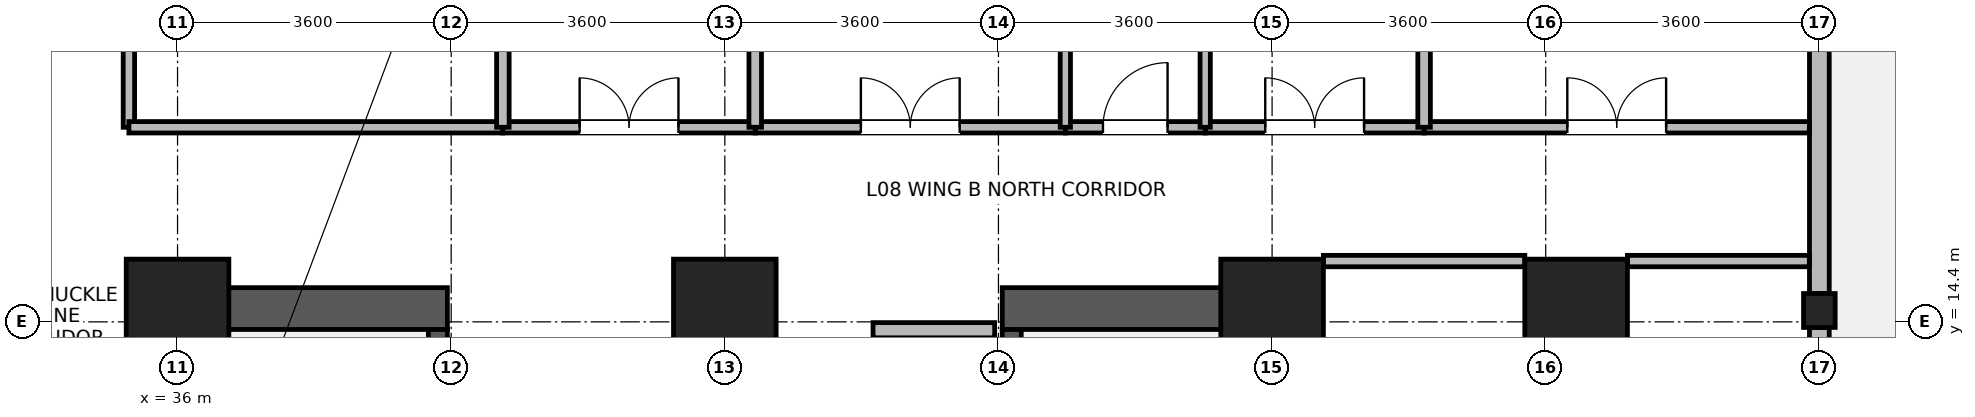
"""IFC4 building model, lengths in metres.
Left out: names, types, materials, properties, quantities, classifications, styles, units other than length and angle.
Written with IfcOpenShell. Run it as: python <this file> out.ifc"""

import sys

from ifc_helpers import new_model, si_unit, direction, frame, frame_2d, origin, origin_2d, place, context, subcontext, project, spatial, rectangle, i_section, extrude, source, transform, mapped, element, fill, save


model = new_model("IFC4")
c1 = context("Model", 3, precision=1e-05, world=origin(), true_north=direction((0.0, 1.0)))
c2 = subcontext(c1, "Body", "Model", "MODEL_VIEW")
j1 = project(units=[si_unit("LENGTHUNIT", "METRE"), si_unit("PLANEANGLEUNIT", "RADIAN")], contexts=[c1])
p1 = place(None, origin())
s1 = spatial("IfcSite", under=j1, at=p1, CompositionType="ELEMENT")
p2 = place(p1, origin())
s2 = spatial("IfcBuilding", under=s1, at=p2, CompositionType="ELEMENT")
p3 = place(p2, frame((0.0, 0.0, 36.4)))
s3 = spatial("IfcBuildingStorey", under=s2, at=p3, CompositionType="ELEMENT", Elevation=36.4)
for number, where, z_axis, x_axis in (
    (1, (36.075, 6.75, 0.0), (0.0, 0.0, 1.0), (0.0, 1.0, 0.0)),
    (2, (50.325, 6.75, 0.0), (0.0, 0.0, 1.0), (0.0, 1.0, 0.0)),
):
    element("IfcWall", number, at=place(p3, frame(where, z_axis=z_axis, x_axis=x_axis)), inside=s3, PredefinedType="SHEAR", context=c2, shape_type="SweptSolid", body=[
        extrude(rectangle(XDim=8.1, YDim=0.55, at=frame_2d((4.05, 0.0))), origin(), (0.0, 0.0, 1.0), 3.45),
    ])
for number, where, z_axis, x_axis in (
    (3, (36.35, 14.575, 0.0), (0.0, 0.0, 1.0), (1.0, 0.0, 0.0)),
    (4, (46.85, 14.575, 0.0), (0.0, 0.0, 1.0), (1.0, 0.0, 0.0)),
):
    element("IfcWall", number, at=place(p3, frame(where, z_axis=z_axis, x_axis=x_axis)), inside=s3, PredefinedType="SHEAR", context=c2, shape_type="SweptSolid", body=[
        extrude(rectangle(XDim=3.2, YDim=0.55, at=frame_2d((1.6, 0.0))), origin(), (0.0, 0.0, 1.0), 3.45),
    ])
p4 = place(p3, frame((39.425, 7.3, 0.0), z_axis=(0.0, 0.0, 1.0), x_axis=(0.0, 1.0, 0.0)))
e5 = element("IfcWall", 5, at=p4, inside=s3, PredefinedType="SHEAR", context=c2, shape_type="SweptSolid", body=[
    extrude(rectangle(XDim=7.0, YDim=0.25, at=frame_2d((3.5, 0.0))), origin(), (0.0, 0.0, 1.0), 3.45),
])
p5 = place(p4, frame((0.15, 0.0, 0.0)))
e6 = element("IfcOpeningElement", 6, at=p5, cuts=e5, PredefinedType="OPENING", context=c2, shape_type="SweptSolid", body=[
    extrude(rectangle(XDim=1.1, YDim=2.08, at=frame_2d((0.55, 1.04))), frame((0.0, 0.135, 0.0), z_axis=(0.0, -1.0, 0.0), x_axis=(1.0, 0.0, 0.0)), (0.0, 0.0, 1.0), 0.27),
])
p6 = place(p3, frame((46.975, 7.3, 0.0), z_axis=(0.0, 0.0, 1.0), x_axis=(0.0, 1.0, 0.0)))
e7 = element("IfcWall", 7, at=p6, inside=s3, PredefinedType="SHEAR", context=c2, shape_type="SweptSolid", body=[
    extrude(rectangle(XDim=7.0, YDim=0.25, at=frame_2d((3.5, 0.0))), origin(), (0.0, 0.0, 1.0), 3.45),
])
p7 = place(p6, frame((0.15, 0.0, 0.0)))
e8 = element("IfcOpeningElement", 8, at=p7, cuts=e7, PredefinedType="OPENING", context=c2, shape_type="SweptSolid", body=[
    extrude(rectangle(XDim=1.1, YDim=2.08, at=frame_2d((0.55, 1.04))), frame((0.0, 0.135, 0.0), z_axis=(0.0, -1.0, 0.0), x_axis=(1.0, 0.0, 0.0)), (0.0, 0.0, 1.0), 0.27),
])
m1 = source(origin(), c2, "Body", "SweptSolid", [
    extrude(rectangle(XDim=1.35, YDim=1.35, at=origin_2d()), origin(), (0.0, 0.0, 1.0), 3.7),
])
for number, where, z_axis, x_axis in (
    (9, (36.0, 14.55, 0.0), (0.0, 0.0, 1.0), (1.0, 0.0, 0.0)),
    (10, (43.2, 14.55, 0.0), (0.0, 0.0, 1.0), (1.0, 0.0, 0.0)),
    (11, (50.4, 14.55, 0.0), (0.0, 0.0, 1.0), (1.0, 0.0, 0.0)),
    (12, (54.4, 14.55, 0.0), (0.0, 0.0, 1.0), (1.0, 0.0, 0.0)),
):
    element("IfcColumn", number, at=place(p3, frame(where, z_axis=z_axis, x_axis=x_axis)), inside=s3, PredefinedType="COLUMN", context=c2, shape_type="MappedRepresentation", body=[
        mapped(m1, transform((0.0, 0.0, 0.0), x_axis=(1.0, 0.0, 0.0), y_axis=(0.0, 1.0, 0.0), z_axis=(0.0, 0.0, 1.0), scale=1.0)),
    ])
m2 = source(origin(), c2, "Body", "SweptSolid", [
    extrude(i_section(OverallWidth=0.416, OverallDepth=0.446, WebThickness=0.029, FlangeThickness=0.04, FilletRadius=0.015, at=origin_2d()), origin(), (0.0, 0.0, 1.0), 3.7),
])
p8 = place(p3, frame((57.6, 14.55, 0.0), z_axis=(0.0, 0.0, 1.0), x_axis=(1.0, 0.0, 0.0)))
e13 = element("IfcColumn", 13, at=p8, inside=s3, PredefinedType="COLUMN", context=c2, shape_type="MappedRepresentation", body=[
    mapped(m2, transform((0.0, 0.0, 0.0), x_axis=(1.0, 0.0, 0.0), y_axis=(0.0, 1.0, 0.0), z_axis=(0.0, 0.0, 1.0), scale=1.0)),
])
p9 = place(p3, frame((57.6, 14.326, 0.0), z_axis=(0.0, 0.0, 1.0), x_axis=(0.0, -1.0, 0.0)))
e14 = element("IfcWall", 14, at=p9, inside=s3, PredefinedType="STANDARD", context=c2, shape_type="SweptSolid", body=[
    extrude(rectangle(XDim=7.052, YDim=0.26, at=frame_2d((3.526, 0.0))), origin(), (0.0, 0.0, 1.0), 2.93),
])
p10 = place(p9, frame((0.863, 0.0, 0.85)))
e15 = element("IfcOpeningElement", 15, at=p10, cuts=e14, PredefinedType="OPENING", context=c2, shape_type="SweptSolid", body=[
    extrude(rectangle(XDim=1.8, YDim=1.85, at=frame_2d((0.9, 0.925))), frame((0.0, 0.14, 0.0), z_axis=(0.0, -1.0, 0.0), x_axis=(1.0, 0.0, 0.0)), (0.0, 0.0, 1.0), 0.28),
])
p11 = place(p9, frame((4.389, 0.0, 0.85)))
e16 = element("IfcOpeningElement", 16, at=p11, cuts=e14, PredefinedType="OPENING", context=c2, shape_type="SweptSolid", body=[
    extrude(rectangle(XDim=1.8, YDim=1.85, at=frame_2d((0.9, 0.925))), frame((0.0, 0.14, 0.0), z_axis=(0.0, -1.0, 0.0), x_axis=(1.0, 0.0, 0.0)), (0.0, 0.0, 1.0), 0.28),
])
p12 = place(p3, frame((57.6, 21.376, 0.0), z_axis=(0.0, 0.0, 1.0), x_axis=(0.0, -1.0, 0.0)))
e17 = element("IfcWall", 17, at=p12, inside=s3, PredefinedType="STANDARD", context=c2, shape_type="SweptSolid", body=[
    extrude(rectangle(XDim=6.602, YDim=0.26, at=frame_2d((3.301, 0.0))), origin(), (0.0, 0.0, 1.0), 2.93),
])
p13 = place(p12, frame((0.75, 0.0, 0.85)))
e18 = element("IfcOpeningElement", 18, at=p13, cuts=e17, PredefinedType="OPENING", context=c2, shape_type="SweptSolid", body=[
    extrude(rectangle(XDim=1.8, YDim=1.85, at=frame_2d((0.9, 0.925))), frame((0.0, 0.14, 0.0), z_axis=(0.0, -1.0, 0.0), x_axis=(1.0, 0.0, 0.0)), (0.0, 0.0, 1.0), 0.28),
])
p14 = place(p3, frame((45.15, 14.29, 0.0), z_axis=(0.0, 0.0, 1.0), x_axis=(1.0, 0.0, 0.0)))
e19 = element("IfcWall", 19, at=p14, inside=s3, PredefinedType="PARTITIONING", context=c2, shape_type="SweptSolid", body=[
    extrude(rectangle(XDim=1.6, YDim=0.2, at=frame_2d((0.8, 0.0))), origin(), (0.0, 0.0, 1.0), 2.23),
])
p15 = place(p3, frame((35.36, 16.96, 0.0), z_axis=(0.0, 0.0, 1.0), x_axis=(0.0, 1.0, 0.0)))
e20 = element("IfcWall", 20, at=p15, inside=s3, PredefinedType="PARTITIONING", context=c2, shape_type="SweptSolid", body=[
    extrude(rectangle(XDim=3.965, YDim=0.15, at=frame_2d((1.982, 0.0))), origin(), (0.0, 0.0, 1.0), 3.43),
])
p16 = place(p15, frame((1.333, 0.0, 0.0)))
e21 = element("IfcOpeningElement", 21, at=p16, cuts=e20, PredefinedType="OPENING", context=c2, shape_type="SweptSolid", body=[
    extrude(rectangle(XDim=1.3, YDim=2.12, at=frame_2d((0.65, 1.06))), frame((0.0, 0.085, 0.0), z_axis=(0.0, -1.0, 0.0), x_axis=(1.0, 0.0, 0.0)), (0.0, 0.0, 1.0), 0.17),
])
p17 = place(p3, frame((51.075, 15.2, 0.0), z_axis=(0.0, 0.0, 1.0), x_axis=(1.0, 0.0, 0.0)))
e22 = element("IfcWall", 22, at=p17, inside=s3, PredefinedType="PARTITIONING", context=c2, shape_type="SweptSolid", body=[
    extrude(rectangle(XDim=2.65, YDim=0.15, at=frame_2d((1.325, 0.0))), origin(), (0.0, 0.0, 1.0), 3.43),
])
p18 = place(p3, frame((55.075, 15.2, 0.0), z_axis=(0.0, 0.0, 1.0), x_axis=(1.0, 0.0, 0.0)))
e23 = element("IfcWall", 23, at=p18, inside=s3, PredefinedType="PARTITIONING", context=c2, shape_type="SweptSolid", body=[
    extrude(rectangle(XDim=2.393, YDim=0.15, at=frame_2d((1.197, 0.0))), origin(), (0.0, 0.0, 1.0), 3.43),
])
p19 = place(p3, frame((52.4, 16.96, 0.0), z_axis=(0.0, 0.0, 1.0), x_axis=(1.0, 0.0, 0.0)))
e24 = element("IfcWall", 24, at=p19, inside=s3, PredefinedType="PARTITIONING", context=c2, shape_type="SweptSolid", body=[
    extrude(rectangle(XDim=5.068, YDim=0.15, at=frame_2d((2.534, 0.0))), origin(), (0.0, 0.0, 1.0), 3.43),
])
p20 = place(p19, frame((1.884, 0.0, 0.0)))
e25 = element("IfcOpeningElement", 25, at=p20, cuts=e24, PredefinedType="OPENING", context=c2, shape_type="SweptSolid", body=[
    extrude(rectangle(XDim=1.3, YDim=2.12, at=frame_2d((0.65, 1.06))), frame((0.0, 0.085, 0.0), z_axis=(0.0, -1.0, 0.0), x_axis=(1.0, 0.0, 0.0)), (0.0, 0.0, 1.0), 0.17),
])
p21 = place(p3, frame((35.36, 16.96, 0.0), z_axis=(0.0, 0.0, 1.0), x_axis=(1.0, 0.0, 0.0)))
e26 = element("IfcWall", 26, at=p21, inside=s3, PredefinedType="PARTITIONING", context=c2, shape_type="SweptSolid", body=[
    extrude(rectangle(XDim=4.92, YDim=0.15, at=frame_2d((2.46, 0.0))), origin(), (0.0, 0.0, 1.0), 3.43),
])
p22 = place(p3, frame((43.6, 16.96, 0.0), z_axis=(0.0, 0.0, 1.0), x_axis=(1.0, 0.0, 0.0)))
e27 = element("IfcWall", 27, at=p22, inside=s3, PredefinedType="PARTITIONING", context=c2, shape_type="SweptSolid", body=[
    extrude(rectangle(XDim=4.08, YDim=0.15, at=frame_2d((2.04, 0.0))), origin(), (0.0, 0.0, 1.0), 3.43),
])
p23 = place(p22, frame((1.39, 0.0, 0.0)))
e28 = element("IfcOpeningElement", 28, at=p23, cuts=e27, PredefinedType="OPENING", context=c2, shape_type="SweptSolid", body=[
    extrude(rectangle(XDim=1.3, YDim=2.12, at=frame_2d((0.65, 1.06))), frame((0.0, 0.085, 0.0), z_axis=(0.0, -1.0, 0.0), x_axis=(1.0, 0.0, 0.0)), (0.0, 0.0, 1.0), 0.17),
])
p24 = place(p3, frame((40.28, 16.96, 0.0), z_axis=(0.0, 0.0, 1.0), x_axis=(1.0, 0.0, 0.0)))
e29 = element("IfcWall", 29, at=p24, inside=s3, PredefinedType="PARTITIONING", context=c2, shape_type="SweptSolid", body=[
    extrude(rectangle(XDim=3.32, YDim=0.15, at=frame_2d((1.66, 0.0))), origin(), (0.0, 0.0, 1.0), 3.43),
])
p25 = place(p24, frame((1.01, 0.0, 0.0)))
e30 = element("IfcOpeningElement", 30, at=p25, cuts=e29, PredefinedType="OPENING", context=c2, shape_type="SweptSolid", body=[
    extrude(rectangle(XDim=1.3, YDim=2.12, at=frame_2d((0.65, 1.06))), frame((0.0, 0.085, 0.0), z_axis=(0.0, -1.0, 0.0), x_axis=(1.0, 0.0, 0.0)), (0.0, 0.0, 1.0), 0.17),
])
p26 = place(p3, frame((49.52, 16.96, 0.0), z_axis=(0.0, 0.0, 1.0), x_axis=(1.0, 0.0, 0.0)))
e31 = element("IfcWall", 31, at=p26, inside=s3, PredefinedType="PARTITIONING", context=c2, shape_type="SweptSolid", body=[
    extrude(rectangle(XDim=2.88, YDim=0.15, at=frame_2d((1.44, 0.0))), origin(), (0.0, 0.0, 1.0), 3.43),
])
p27 = place(p26, frame((0.79, 0.0, 0.0)))
e32 = element("IfcOpeningElement", 32, at=p27, cuts=e31, PredefinedType="OPENING", context=c2, shape_type="SweptSolid", body=[
    extrude(rectangle(XDim=1.3, YDim=2.12, at=frame_2d((0.65, 1.06))), frame((0.0, 0.085, 0.0), z_axis=(0.0, -1.0, 0.0), x_axis=(1.0, 0.0, 0.0)), (0.0, 0.0, 1.0), 0.17),
])
p28 = place(p3, frame((47.68, 16.96, 0.0), z_axis=(0.0, 0.0, 1.0), x_axis=(1.0, 0.0, 0.0)))
e33 = element("IfcWall", 33, at=p28, inside=s3, PredefinedType="PARTITIONING", context=c2, shape_type="SweptSolid", body=[
    extrude(rectangle(XDim=1.84, YDim=0.15, at=frame_2d((0.92, 0.0))), origin(), (0.0, 0.0, 1.0), 3.43),
])
p29 = place(p28, frame((0.495, 0.0, 0.0)))
e34 = element("IfcOpeningElement", 34, at=p29, cuts=e33, PredefinedType="OPENING", context=c2, shape_type="SweptSolid", body=[
    extrude(rectangle(XDim=0.85, YDim=2.04, at=frame_2d((0.425, 1.02))), frame((0.0, 0.085, 0.0), z_axis=(0.0, -1.0, 0.0), x_axis=(1.0, 0.0, 0.0)), (0.0, 0.0, 1.0), 0.17),
])
for number, where, z_axis, x_axis in (
    (35, (40.28, 16.96, 0.0), (0.0, 0.0, 1.0), (0.0, 1.0, 0.0)),
    (36, (43.6, 16.96, 0.0), (0.0, 0.0, 1.0), (0.0, 1.0, 0.0)),
):
    element("IfcWall", number, at=place(p3, frame(where, z_axis=z_axis, x_axis=x_axis)), inside=s3, PredefinedType="PARTITIONING", context=c2, shape_type="SweptSolid", body=[
        extrude(rectangle(XDim=9.8, YDim=0.165, at=frame_2d((4.9, 0.0))), origin(), (0.0, 0.0, 1.0), 3.43),
    ])
for number, where, z_axis, x_axis in (
    (37, (47.68, 16.96, 0.0), (0.0, 0.0, 1.0), (0.0, 1.0, 0.0)),
    (38, (49.52, 16.96, 0.0), (0.0, 0.0, 1.0), (0.0, 1.0, 0.0)),
):
    element("IfcWall", number, at=place(p3, frame(where, z_axis=z_axis, x_axis=x_axis)), inside=s3, PredefinedType="PARTITIONING", context=c2, shape_type="SweptSolid", body=[
        extrude(rectangle(XDim=9.8, YDim=0.135, at=frame_2d((4.9, 0.0))), origin(), (0.0, 0.0, 1.0), 3.43),
    ])
p30 = place(p3, frame((52.4, 16.96, 0.0), z_axis=(0.0, 0.0, 1.0), x_axis=(0.0, 1.0, 0.0)))
e39 = element("IfcWall", 39, at=p30, inside=s3, PredefinedType="PARTITIONING", context=c2, shape_type="SweptSolid", body=[
    extrude(rectangle(XDim=9.8, YDim=0.165, at=frame_2d((4.9, 0.0))), origin(), (0.0, 0.0, 1.0), 3.43),
])
p31 = place(p20, origin())
e40 = element("IfcDoor", 40, at=p31, inside=s3, OperationType="DOUBLE_DOOR_SINGLE_SWING", PredefinedType="DOOR", context=c2, shape_type="SweptSolid", body=[
    extrude(rectangle(XDim=1.3, YDim=2.12, at=frame_2d((0.65, 1.06))), frame((0.0, 0.025, 0.0), z_axis=(0.0, -1.0, 0.0), x_axis=(1.0, 0.0, 0.0)), (0.0, 0.0, 1.0), 0.05),
])
fill(e25, e40)
p32 = place(p23, origin())
e41 = element("IfcDoor", 41, at=p32, inside=s3, OperationType="DOUBLE_DOOR_SINGLE_SWING", PredefinedType="DOOR", context=c2, shape_type="SweptSolid", body=[
    extrude(rectangle(XDim=1.3, YDim=2.12, at=frame_2d((0.65, 1.06))), frame((0.0, 0.025, 0.0), z_axis=(0.0, -1.0, 0.0), x_axis=(1.0, 0.0, 0.0)), (0.0, 0.0, 1.0), 0.05),
])
fill(e28, e41)
p33 = place(p25, origin())
e42 = element("IfcDoor", 42, at=p33, inside=s3, OperationType="DOUBLE_DOOR_SINGLE_SWING", PredefinedType="DOOR", context=c2, shape_type="SweptSolid", body=[
    extrude(rectangle(XDim=1.3, YDim=2.12, at=frame_2d((0.65, 1.06))), frame((0.0, 0.025, 0.0), z_axis=(0.0, -1.0, 0.0), x_axis=(1.0, 0.0, 0.0)), (0.0, 0.0, 1.0), 0.05),
])
fill(e30, e42)
p34 = place(p27, origin())
e43 = element("IfcDoor", 43, at=p34, inside=s3, OperationType="DOUBLE_DOOR_SINGLE_SWING", PredefinedType="DOOR", context=c2, shape_type="SweptSolid", body=[
    extrude(rectangle(XDim=1.3, YDim=2.12, at=frame_2d((0.65, 1.06))), frame((0.0, 0.025, 0.0), z_axis=(0.0, -1.0, 0.0), x_axis=(1.0, 0.0, 0.0)), (0.0, 0.0, 1.0), 0.05),
])
fill(e32, e43)
p35 = place(p29, origin())
e44 = element("IfcDoor", 44, at=p35, inside=s3, OperationType="SINGLE_SWING_RIGHT", PredefinedType="DOOR", context=c2, shape_type="SweptSolid", body=[
    extrude(rectangle(XDim=0.85, YDim=2.04, at=frame_2d((0.425, 1.02))), frame((0.0, 0.025, 0.0), z_axis=(0.0, -1.0, 0.0), x_axis=(1.0, 0.0, 0.0)), (0.0, 0.0, 1.0), 0.05),
])
fill(e34, e44)
save(model, sys.argv[1])
